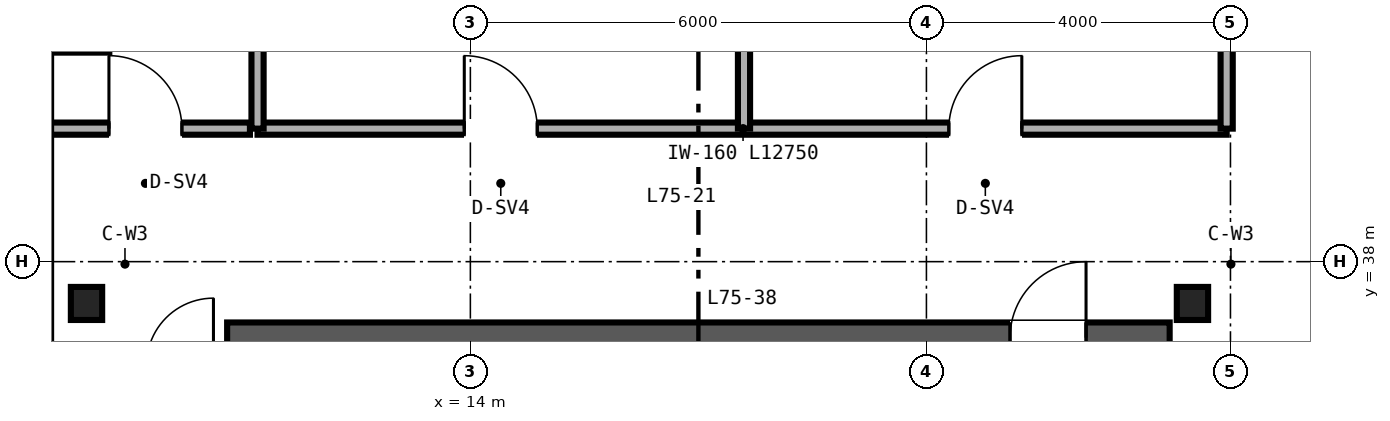
"""IFC4 building model, lengths in metres.
Left out: names, types, materials, properties, quantities, classifications, styles, units other than length and angle.
Written with IfcOpenShell. Run it as: python <this file> out.ifc"""

import sys

from ifc_helpers import new_model, si_unit, direction, frame, frame_2d, origin, origin_2d, place, context, subcontext, project, spatial, rectangle, i_section, extrude, source, transform, mapped, element, fill, save


model = new_model("IFC4")
c1 = context("Model", 3, precision=1e-05, world=origin(), true_north=direction((0.0, 1.0)))
c2 = subcontext(c1, "Body", "Model", "MODEL_VIEW")
j1 = project(units=[si_unit("LENGTHUNIT", "METRE"), si_unit("PLANEANGLEUNIT", "RADIAN")], contexts=[c1])
p1 = place(None, origin())
s1 = spatial("IfcSite", under=j1, at=p1, CompositionType="ELEMENT")
p2 = place(p1, origin())
s2 = spatial("IfcBuilding", under=s1, at=p2, CompositionType="ELEMENT")
p3 = place(p2, frame((0.0, 0.0, 294.0)))
s3 = spatial("IfcBuildingStorey", under=s2, at=p3, CompositionType="ELEMENT", Elevation=294.0)
p4 = place(p3, frame((10.8, 37.0, 0.0), z_axis=(0.0, 0.0, 1.0), x_axis=(1.0, 0.0, 0.0)))
e1 = element("IfcWall", 1, at=p4, inside=s3, PredefinedType="SHEAR", context=c2, shape_type="SweptSolid", body=[
    extrude(rectangle(XDim=12.4, YDim=0.4, at=frame_2d((6.2, 0.0))), origin(), (0.0, 0.0, 1.0), 3.38),
])
p5 = place(p4, frame((10.3, 0.0, 0.0)))
e2 = element("IfcOpeningElement", 2, at=p5, cuts=e1, PredefinedType="OPENING", context=c2, shape_type="SweptSolid", body=[
    extrude(rectangle(XDim=1.0, YDim=2.15, at=frame_2d((0.5, 1.075))), frame((0.0, 0.21, 0.0), z_axis=(0.0, -1.0, 0.0), x_axis=(1.0, 0.0, 0.0)), (0.0, 0.0, 1.0), 0.42),
])
m1 = source(origin(), c2, "Body", "SweptSolid", [
    extrude(i_section(OverallWidth=0.412, OverallDepth=0.435, WebThickness=0.036, FlangeThickness=0.057, FilletRadius=0.025, at=origin_2d()), origin(), (0.0, 0.0, 1.0), 3.38),
])
for number, where, z_axis, x_axis in (
    (3, (8.95, 37.45, 0.0), (0.0, 0.0, 1.0), (1.0, 0.0, 0.0)),
    (4, (23.5, 37.45, 0.0), (0.0, 0.0, 1.0), (1.0, 0.0, 0.0)),
):
    element("IfcColumn", number, at=place(p3, frame(where, z_axis=z_axis, x_axis=x_axis)), inside=s3, PredefinedType="COLUMN", context=c2, shape_type="MappedRepresentation", body=[
        mapped(m1, transform((0.0, 0.0, 0.0), scale=1.0)),
    ])
p6 = place(p3, frame((11.2, 39.75, 0.0), z_axis=(0.0, 0.0, 1.0), x_axis=(1.0, 0.0, 0.0)))
e5 = element("IfcWall", 5, at=p6, inside=s3, PredefinedType="PARTITIONING", context=c2, shape_type="SweptSolid", body=[
    extrude(rectangle(XDim=12.75, YDim=0.16, at=frame_2d((6.375, 0.0))), origin(), (0.0, 0.0, 1.0), 3.38),
])
p7 = place(p6, frame((2.72, 0.0, 0.0)))
e6 = element("IfcOpeningElement", 6, at=p7, cuts=e5, PredefinedType="OPENING", context=c2, shape_type="SweptSolid", body=[
    extrude(rectangle(XDim=0.96, YDim=2.15, at=frame_2d((0.48, 1.075))), frame((0.0, 0.09, 0.0), z_axis=(0.0, -1.0, 0.0), x_axis=(1.0, 0.0, 0.0)), (0.0, 0.0, 1.0), 0.18),
])
p8 = place(p6, frame((9.095, 0.0, 0.0)))
e7 = element("IfcOpeningElement", 7, at=p8, cuts=e5, PredefinedType="OPENING", context=c2, shape_type="SweptSolid", body=[
    extrude(rectangle(XDim=0.96, YDim=2.15, at=frame_2d((0.48, 1.075))), frame((0.0, 0.09, 0.0), z_axis=(0.0, -1.0, 0.0), x_axis=(1.0, 0.0, 0.0)), (0.0, 0.0, 1.0), 0.18),
])
p9 = place(p3, frame((11.2, 39.75, 0.0), z_axis=(0.0, 0.0, 1.0), x_axis=(0.0, 1.0, 0.0)))
e8 = element("IfcWall", 8, at=p9, inside=s3, PredefinedType="PARTITIONING", context=c2, shape_type="SweptSolid", body=[
    extrude(rectangle(XDim=2.99, YDim=0.16, at=frame_2d((1.495, 0.0))), origin(), (0.0, 0.0, 1.0), 3.38),
])
p10 = place(p3, frame((23.95, 39.75, 0.0), z_axis=(0.0, 0.0, 1.0), x_axis=(0.0, 1.0, 0.0)))
e9 = element("IfcWall", 9, at=p10, inside=s3, PredefinedType="PARTITIONING", context=c2, shape_type="SweptSolid", body=[
    extrude(rectangle(XDim=3.89, YDim=0.16, at=frame_2d((1.945, 0.0))), origin(), (0.0, 0.0, 1.0), 3.38),
])
p11 = place(p3, frame((17.6, 39.75, 0.0), z_axis=(0.0, 0.0, 1.0), x_axis=(0.0, 1.0, 0.0)))
e10 = element("IfcWall", 10, at=p11, inside=s3, PredefinedType="PARTITIONING", context=c2, shape_type="SweptSolid", body=[
    extrude(rectangle(XDim=3.89, YDim=0.16, at=frame_2d((1.945, 0.0))), origin(), (0.0, 0.0, 1.0), 2.687),
])
p12 = place(p3, frame((8.35, 39.75, 0.0), z_axis=(0.0, 0.0, 1.0), x_axis=(1.0, 0.0, 0.0)))
e11 = element("IfcWall", 11, at=p12, inside=s3, PredefinedType="PARTITIONING", context=c2, shape_type="SweptSolid", body=[
    extrude(rectangle(XDim=2.75, YDim=0.16, at=frame_2d((1.375, 0.0))), origin(), (0.0, 0.0, 1.0), 3.38),
])
p13 = place(p12, frame((0.895, 0.0, 0.0)))
e12 = element("IfcOpeningElement", 12, at=p13, cuts=e11, PredefinedType="OPENING", context=c2, shape_type="SweptSolid", body=[
    extrude(rectangle(XDim=0.96, YDim=2.15, at=frame_2d((0.48, 1.075))), frame((0.0, 0.09, 0.0), z_axis=(0.0, -1.0, 0.0), x_axis=(1.0, 0.0, 0.0)), (0.0, 0.0, 1.0), 0.18),
])
m2 = source(origin(), c2, "Body", "SweptSolid", [
    extrude(rectangle(XDim=1.0, YDim=2.15, at=frame_2d((0.5, 1.075))), frame((0.0, 0.025, 0.0), z_axis=(0.0, -1.0, 0.0), x_axis=(1.0, 0.0, 0.0)), (0.0, 0.0, 1.0), 0.05),
])
p14 = place(p5, origin())
e13 = element("IfcDoor", 13, at=p14, inside=s3, OperationType="SINGLE_SWING_RIGHT", PredefinedType="DOOR", context=c2, shape_type="MappedRepresentation", body=[
    mapped(m2, transform((0.0, 0.0, 0.0), scale=1.0)),
])
fill(e2, e13)
m3 = source(origin(), c2, "Body", "SweptSolid", [
    extrude(rectangle(XDim=0.96, YDim=2.15, at=frame_2d((0.48, 1.075))), frame((0.0, 0.025, 0.0), z_axis=(0.0, -1.0, 0.0), x_axis=(1.0, 0.0, 0.0)), (0.0, 0.0, 1.0), 0.05),
])
p15 = place(p7, origin())
e14 = element("IfcDoor", 14, at=p15, inside=s3, OperationType="SINGLE_SWING_LEFT", PredefinedType="DOOR", context=c2, shape_type="MappedRepresentation", body=[
    mapped(m3, transform((0.0, 0.0, 0.0), scale=1.0)),
])
fill(e6, e14)
p16 = place(p8, origin())
e15 = element("IfcDoor", 15, at=p16, inside=s3, OperationType="SINGLE_SWING_RIGHT", PredefinedType="DOOR", context=c2, shape_type="MappedRepresentation", body=[
    mapped(m3, transform((0.0, 0.0, 0.0), scale=1.0)),
])
fill(e7, e15)
p17 = place(p13, origin())
e16 = element("IfcDoor", 16, at=p17, inside=s3, OperationType="SINGLE_SWING_LEFT", PredefinedType="DOOR", context=c2, shape_type="MappedRepresentation", body=[
    mapped(m3, transform((0.0, 0.0, 0.0), scale=1.0)),
])
fill(e12, e16)
save(model, sys.argv[1])
